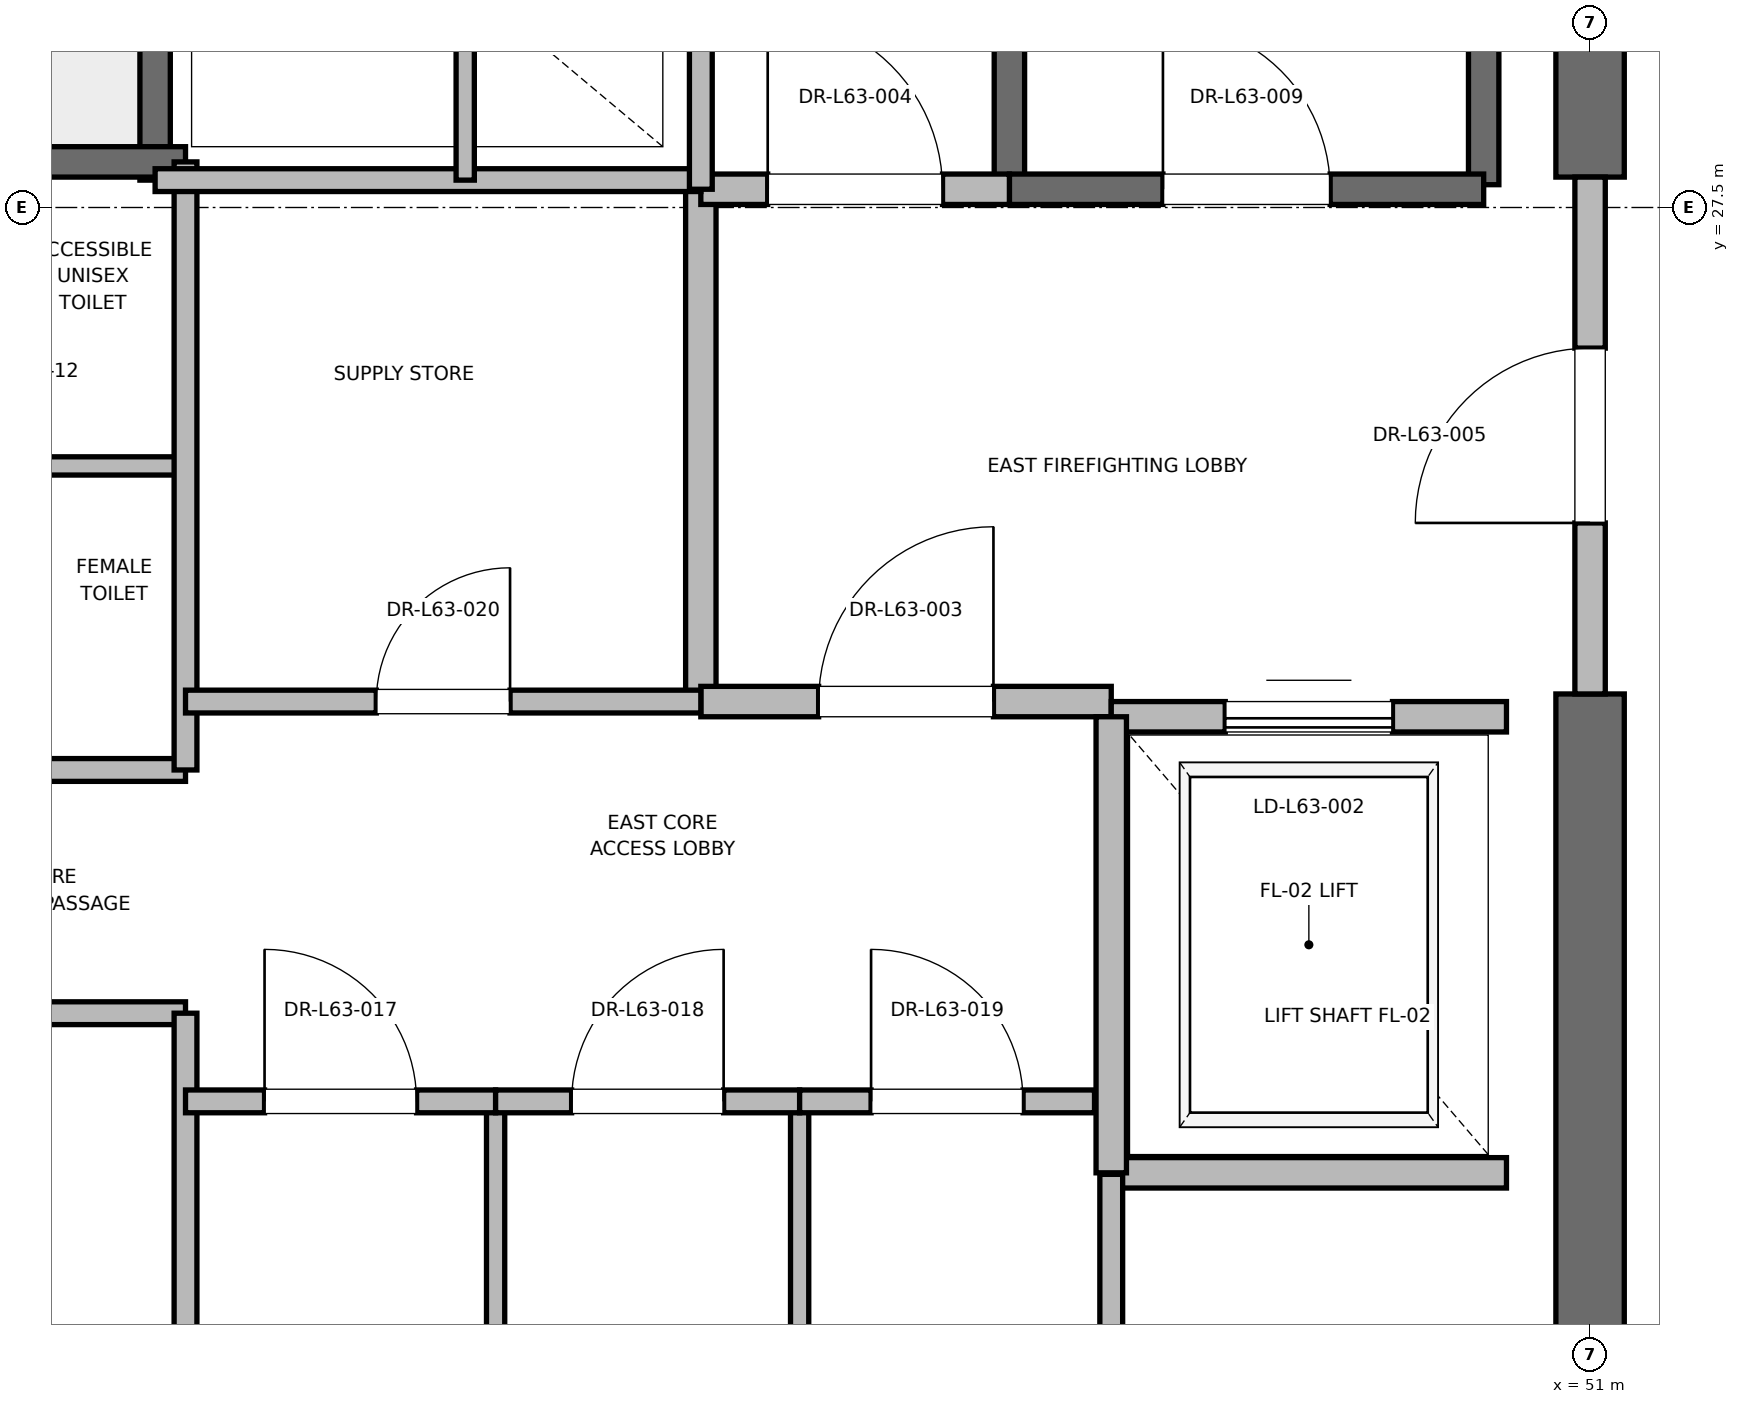
"""IFC4 building model, lengths in metres.
Left out: names, types, materials, properties, quantities, classifications, styles, units other than length and angle.
Written with IfcOpenShell. Run it as: python <this file> out.ifc"""

import sys

from ifc_helpers import new_model, si_unit, direction, frame, frame_2d, origin, place, context, subcontext, project, spatial, rectangle, extrude, element, fill, save


model = new_model("IFC4")
c1 = context("Model", 3, precision=1e-05, world=origin(), true_north=direction((0.0, 1.0)))
c2 = subcontext(c1, "Body", "Model", "MODEL_VIEW")
j1 = project(units=[si_unit("LENGTHUNIT", "METRE"), si_unit("PLANEANGLEUNIT", "RADIAN")], contexts=[c1])
p1 = place(None, origin())
s1 = spatial("IfcSite", under=j1, at=p1, CompositionType="ELEMENT")
p2 = place(p1, origin())
s2 = spatial("IfcBuilding", under=s1, at=p2, CompositionType="ELEMENT")
p3 = place(p2, frame((0.0, 0.0, 271.2)))
s3 = spatial("IfcBuildingStorey", under=s2, at=p3, CompositionType="ELEMENT", Elevation=271.2)
p4 = place(p3, frame((51.0, 18.5, 0.0), z_axis=(0.0, 0.0, 1.0), x_axis=(0.0, 1.0, 0.0)))
e1 = element("IfcWall", 1, at=p4, inside=s3, PredefinedType="SHEAR", context=c2, shape_type="SweptSolid", body=[
    extrude(rectangle(XDim=5.8, YDim=0.45, at=frame_2d((2.9, 0.0))), origin(), (0.0, 0.0, 1.0), 3.785),
])
p5 = place(p3, frame((51.0, 27.7, 0.0), z_axis=(0.0, 0.0, 1.0), x_axis=(0.0, 1.0, 0.0)))
e2 = element("IfcWall", 2, at=p5, inside=s3, PredefinedType="SHEAR", context=c2, shape_type="SweptSolid", body=[
    extrude(rectangle(XDim=8.8, YDim=0.45, at=frame_2d((4.4, 0.0))), origin(), (0.0, 0.0, 1.0), 3.785),
])
p6 = place(p3, frame((50.3, 27.65, 0.0), z_axis=(0.0, 0.0, 1.0), x_axis=(0.0, 1.0, 0.0)))
e3 = element("IfcWall", 3, at=p6, inside=s3, PredefinedType="SOLIDWALL", context=c2, shape_type="SweptSolid", body=[
    extrude(rectangle(XDim=8.15, YDim=0.2, at=frame_2d((4.075, 0.0))), origin(), (0.0, 0.0, 1.0), 3.785),
])
p7 = place(p3, frame((47.18, 27.62, 0.0), z_axis=(0.0, 0.0, 1.0), x_axis=(0.0, 1.0, 0.0)))
e4 = element("IfcWall", 4, at=p7, inside=s3, PredefinedType="SOLIDWALL", context=c2, shape_type="SweptSolid", body=[
    extrude(rectangle(XDim=8.18, YDim=0.2, at=frame_2d((4.09, 0.0))), origin(), (0.0, 0.0, 1.0), 3.785),
])
p8 = place(p3, frame((47.18, 27.62, 0.0), z_axis=(0.0, 0.0, 1.0), x_axis=(1.0, 0.0, 0.0)))
e5 = element("IfcWall", 5, at=p8, inside=s3, PredefinedType="SOLIDWALL", context=c2, shape_type="SweptSolid", body=[
    extrude(rectangle(XDim=3.12, YDim=0.2, at=frame_2d((1.56, 0.0))), origin(), (0.0, 0.0, 1.0), 3.785),
])
p9 = place(p8, frame((1.01, 0.0, 0.0)))
e6 = element("IfcOpeningElement", 6, at=p9, cuts=e5, PredefinedType="OPENING", context=c2, shape_type="SweptSolid", body=[
    extrude(rectangle(XDim=1.1, YDim=2.15, at=frame_2d((0.55, 1.075))), frame((0.0, 0.1, 0.0), z_axis=(0.0, -1.0, 0.0), x_axis=(1.0, 0.0, 0.0)), (0.0, 0.0, 1.0), 0.2),
])
p10 = place(p3, frame((41.56, 27.68, 0.0), z_axis=(0.0, 0.0, 1.0), x_axis=(0.0, 1.0, 0.0)))
e7 = element("IfcWall", 7, at=p10, inside=s3, PredefinedType="SOLIDWALL", context=c2, shape_type="SweptSolid", body=[
    extrude(rectangle(XDim=8.57, YDim=0.2, at=frame_2d((4.285, 0.0))), origin(), (0.0, 0.0, 1.0), 3.785),
])
p11 = place(p3, frame((38.44, 27.8, 0.0), z_axis=(0.0, 0.0, 1.0), x_axis=(1.0, 0.0, 0.0)))
e8 = element("IfcWall", 8, at=p11, inside=s3, PredefinedType="SOLIDWALL", context=c2, shape_type="SweptSolid", body=[
    extrude(rectangle(XDim=3.32, YDim=0.2, at=frame_2d((1.66, 0.0))), origin(), (0.0, 0.0, 1.0), 3.785),
])
p12 = place(p3, frame((45.15, 24.25, 0.0), z_axis=(0.0, 0.0, 1.0), x_axis=(0.0, 1.0, 0.0)))
e9 = element("IfcWall", 9, at=p12, inside=s3, PredefinedType="PARTITIONING", context=c2, shape_type="SweptSolid", body=[
    extrude(rectangle(XDim=3.37, YDim=0.2, at=frame_2d((1.685, 0.0))), origin(), (0.0, 0.0, 1.0), 3.785),
])
p13 = place(p3, frame((45.15, 24.25, 0.0), z_axis=(0.0, 0.0, 1.0), x_axis=(1.0, 0.0, 0.0)))
e10 = element("IfcWall", 10, at=p13, inside=s3, PredefinedType="PARTITIONING", context=c2, shape_type="SweptSolid", body=[
    extrude(rectangle(XDim=2.7, YDim=0.2, at=frame_2d((1.35, 0.0))), origin(), (0.0, 0.0, 1.0), 3.785),
])
p14 = place(p13, frame((0.775, 0.0, 0.0)))
e11 = element("IfcOpeningElement", 11, at=p14, cuts=e10, PredefinedType="OPENING", context=c2, shape_type="SweptSolid", body=[
    extrude(rectangle(XDim=1.15, YDim=2.2, at=frame_2d((0.575, 1.1))), frame((0.0, 0.1, 0.0), z_axis=(0.0, -1.0, 0.0), x_axis=(1.0, 0.0, 0.0)), (0.0, 0.0, 1.0), 0.2),
])
p15 = place(p3, frame((45.15, 27.62, 0.0), z_axis=(0.0, 0.0, 1.0), x_axis=(1.0, 0.0, 0.0)))
e12 = element("IfcWall", 12, at=p15, inside=s3, PredefinedType="PARTITIONING", context=c2, shape_type="SweptSolid", body=[
    extrude(rectangle(XDim=2.03, YDim=0.2, at=frame_2d((1.015, 0.0))), origin(), (0.0, 0.0, 1.0), 3.785),
])
p16 = place(p15, frame((0.44, 0.0, 0.0)))
e13 = element("IfcOpeningElement", 13, at=p16, cuts=e12, PredefinedType="OPENING", context=c2, shape_type="SweptSolid", body=[
    extrude(rectangle(XDim=1.15, YDim=2.2, at=frame_2d((0.575, 1.1))), frame((0.0, 0.1, 0.0), z_axis=(0.0, -1.0, 0.0), x_axis=(1.0, 0.0, 0.0)), (0.0, 0.0, 1.0), 0.2),
])
p17 = place(p3, frame((51.0, 24.3, 0.0), z_axis=(0.0, 0.0, 1.0), x_axis=(0.0, 1.0, 0.0)))
e14 = element("IfcWall", 14, at=p17, inside=s3, PredefinedType="PARTITIONING", context=c2, shape_type="SweptSolid", body=[
    extrude(rectangle(XDim=3.4, YDim=0.2, at=frame_2d((1.7, 0.0))), origin(), (0.0, 0.0, 1.0), 2.865),
])
p18 = place(p17, frame((1.125, 0.0, 0.0)))
e15 = element("IfcOpeningElement", 15, at=p18, cuts=e14, PredefinedType="OPENING", context=c2, shape_type="SweptSolid", body=[
    extrude(rectangle(XDim=1.15, YDim=2.2, at=frame_2d((0.575, 1.1))), frame((0.0, 0.1, 0.0), z_axis=(0.0, -1.0, 0.0), x_axis=(1.0, 0.0, 0.0)), (0.0, 0.0, 1.0), 0.2),
])
p19 = place(p3, frame((47.85, 21.15, 0.0), z_axis=(0.0, 0.0, 1.0), x_axis=(1.0, 0.0, 0.0)))
e16 = element("IfcWall", 16, at=p19, inside=s3, PredefinedType="SOLIDWALL", context=c2, shape_type="SweptSolid", body=[
    extrude(rectangle(XDim=2.6, YDim=0.2, at=frame_2d((1.3, 0.0))), origin(), (0.0, 0.0, 1.0), 3.785),
])
p20 = place(p3, frame((50.45, 24.15, 0.0), z_axis=(0.0, 0.0, 1.0), x_axis=(-1.0, 0.0, 0.0)))
e17 = element("IfcWall", 17, at=p20, inside=s3, PredefinedType="SOLIDWALL", context=c2, shape_type="SweptSolid", body=[
    extrude(rectangle(XDim=2.6, YDim=0.2, at=frame_2d((1.3, 0.0))), origin(), (0.0, 0.0, 1.0), 2.865),
])
p21 = place(p20, frame((0.75, 0.0, 0.0)))
e18 = element("IfcOpeningElement", 18, at=p21, cuts=e17, PredefinedType="OPENING", context=c2, shape_type="SweptSolid", body=[
    extrude(rectangle(XDim=1.1, YDim=2.2, at=frame_2d((0.55, 1.1))), frame((0.0, 0.1, 0.0), z_axis=(0.0, -1.0, 0.0), x_axis=(1.0, 0.0, 0.0)), (0.0, 0.0, 1.0), 0.2),
])
p22 = place(p3, frame((47.85, 24.15, 0.0), z_axis=(0.0, 0.0, 1.0), x_axis=(0.0, -1.0, 0.0)))
e19 = element("IfcWall", 19, at=p22, inside=s3, PredefinedType="SOLIDWALL", context=c2, shape_type="SweptSolid", body=[
    extrude(rectangle(XDim=3.0, YDim=0.2, at=frame_2d((1.5, 0.0))), origin(), (0.0, 0.0, 1.0), 3.785),
])
for number, where, z_axis, x_axis in (
    (20, (39.95, 22.2, 0.0), (0.0, 0.0, 1.0), (1.0, 0.0, 0.0)),
    (21, (39.95, 23.8, 0.0), (0.0, 0.0, 1.0), (1.0, 0.0, 0.0)),
):
    element("IfcWall", number, at=place(p3, frame(where, z_axis=z_axis, x_axis=x_axis)), inside=s3, PredefinedType="PARTITIONING", context=c2, shape_type="SweptSolid", body=[
        extrude(rectangle(XDim=1.81, YDim=0.15, at=frame_2d((0.905, 0.0))), origin(), (0.0, 0.0, 1.0), 2.85),
    ])
p23 = place(p3, frame((39.95, 25.8, 0.0), z_axis=(0.0, 0.0, 1.0), x_axis=(1.0, 0.0, 0.0)))
e22 = element("IfcWall", 22, at=p23, inside=s3, PredefinedType="PARTITIONING", context=c2, shape_type="SweptSolid", body=[
    extrude(rectangle(XDim=1.81, YDim=0.12, at=frame_2d((0.905, 0.0))), origin(), (0.0, 0.0, 1.0), 2.85),
])
p24 = place(p3, frame((41.76, 18.6, 0.0), z_axis=(0.0, 0.0, 1.0), x_axis=(0.0, 1.0, 0.0)))
e23 = element("IfcWall", 23, at=p24, inside=s3, PredefinedType="PARTITIONING", context=c2, shape_type="SweptSolid", body=[
    extrude(rectangle(XDim=3.6, YDim=0.15, at=frame_2d((1.8, 0.0))), origin(), (0.0, 0.0, 1.0), 2.85),
])
p25 = place(p3, frame((41.76, 23.8, 0.0), z_axis=(0.0, 0.0, 1.0), x_axis=(0.0, 1.0, 0.0)))
e24 = element("IfcWall", 24, at=p25, inside=s3, PredefinedType="PARTITIONING", context=c2, shape_type="SweptSolid", body=[
    extrude(rectangle(XDim=4.0, YDim=0.15, at=frame_2d((2.0, 0.0))), origin(), (0.0, 0.0, 1.0), 2.85),
])
p26 = place(p3, frame((41.56, 27.68, 0.0), z_axis=(0.0, 0.0, 1.0), x_axis=(1.0, 0.0, 0.0)))
e25 = element("IfcWall", 25, at=p26, inside=s3, PredefinedType="PARTITIONING", context=c2, shape_type="SweptSolid", body=[
    extrude(rectangle(XDim=3.59, YDim=0.15, at=frame_2d((1.795, 0.0))), origin(), (0.0, 0.0, 1.0), 2.85),
])
p27 = place(p3, frame((47.85, 18.6, 0.0), z_axis=(0.0, 0.0, 1.0), x_axis=(0.0, 1.0, 0.0)))
e26 = element("IfcWall", 26, at=p27, inside=s3, PredefinedType="PARTITIONING", context=c2, shape_type="SweptSolid", body=[
    extrude(rectangle(XDim=2.54, YDim=0.15, at=frame_2d((1.27, 0.0))), origin(), (0.0, 0.0, 1.0), 2.85),
])
for number, where, z_axis, x_axis in (
    (27, (43.8, 18.6, 0.0), (0.0, 0.0, 1.0), (0.0, 1.0, 0.0)),
    (28, (45.8, 18.6, 0.0), (0.0, 0.0, 1.0), (0.0, 1.0, 0.0)),
):
    element("IfcWall", number, at=place(p3, frame(where, z_axis=z_axis, x_axis=x_axis)), inside=s3, PredefinedType="PARTITIONING", context=c2, shape_type="SweptSolid", body=[
        extrude(rectangle(XDim=3.02, YDim=0.12, at=frame_2d((1.51, 0.0))), origin(), (0.0, 0.0, 1.0), 2.85),
    ])
p28 = place(p3, frame((41.76, 21.62, 0.0), z_axis=(0.0, 0.0, 1.0), x_axis=(1.0, 0.0, 0.0)))
e29 = element("IfcWall", 29, at=p28, inside=s3, PredefinedType="PARTITIONING", context=c2, shape_type="SweptSolid", body=[
    extrude(rectangle(XDim=2.04, YDim=0.15, at=frame_2d((1.02, 0.0))), origin(), (0.0, 0.0, 1.0), 2.85),
])
p29 = place(p28, frame((0.52, 0.0, 0.0)))
e30 = element("IfcOpeningElement", 30, at=p29, cuts=e29, PredefinedType="OPENING", context=c2, shape_type="SweptSolid", body=[
    extrude(rectangle(XDim=1.0, YDim=2.15, at=frame_2d((0.5, 1.075))), frame((0.0, 0.075, 0.0), z_axis=(0.0, -1.0, 0.0), x_axis=(1.0, 0.0, 0.0)), (0.0, 0.0, 1.0), 0.15),
])
p30 = place(p3, frame((43.8, 21.62, 0.0), z_axis=(0.0, 0.0, 1.0), x_axis=(1.0, 0.0, 0.0)))
e31 = element("IfcWall", 31, at=p30, inside=s3, PredefinedType="PARTITIONING", context=c2, shape_type="SweptSolid", body=[
    extrude(rectangle(XDim=2.0, YDim=0.15, at=frame_2d((1.0, 0.0))), origin(), (0.0, 0.0, 1.0), 2.85),
])
p31 = place(p30, frame((0.5, 0.0, 0.0)))
e32 = element("IfcOpeningElement", 32, at=p31, cuts=e31, PredefinedType="OPENING", context=c2, shape_type="SweptSolid", body=[
    extrude(rectangle(XDim=1.0, YDim=2.15, at=frame_2d((0.5, 1.075))), frame((0.0, 0.075, 0.0), z_axis=(0.0, -1.0, 0.0), x_axis=(1.0, 0.0, 0.0)), (0.0, 0.0, 1.0), 0.15),
])
p32 = place(p3, frame((45.8, 21.62, 0.0), z_axis=(0.0, 0.0, 1.0), x_axis=(1.0, 0.0, 0.0)))
e33 = element("IfcWall", 33, at=p32, inside=s3, PredefinedType="PARTITIONING", context=c2, shape_type="SweptSolid", body=[
    extrude(rectangle(XDim=1.94, YDim=0.15, at=frame_2d((0.97, 0.0))), origin(), (0.0, 0.0, 1.0), 2.85),
])
p33 = place(p32, frame((0.47, 0.0, 0.0)))
e34 = element("IfcOpeningElement", 34, at=p33, cuts=e33, PredefinedType="OPENING", context=c2, shape_type="SweptSolid", body=[
    extrude(rectangle(XDim=1.0, YDim=2.15, at=frame_2d((0.5, 1.075))), frame((0.0, 0.075, 0.0), z_axis=(0.0, -1.0, 0.0), x_axis=(1.0, 0.0, 0.0)), (0.0, 0.0, 1.0), 0.15),
])
p34 = place(p3, frame((41.76, 24.25, 0.0), z_axis=(0.0, 0.0, 1.0), x_axis=(1.0, 0.0, 0.0)))
e35 = element("IfcWall", 35, at=p34, inside=s3, PredefinedType="PARTITIONING", context=c2, shape_type="SweptSolid", body=[
    extrude(rectangle(XDim=3.39, YDim=0.15, at=frame_2d((1.695, 0.0))), origin(), (0.0, 0.0, 1.0), 2.85),
])
p35 = place(p34, frame((1.255, 0.0, 0.0)))
e36 = element("IfcOpeningElement", 36, at=p35, cuts=e35, PredefinedType="OPENING", context=c2, shape_type="SweptSolid", body=[
    extrude(rectangle(XDim=0.88, YDim=2.1, at=frame_2d((0.44, 1.05))), frame((0.0, 0.075, 0.0), z_axis=(0.0, -1.0, 0.0), x_axis=(1.0, 0.0, 0.0)), (0.0, 0.0, 1.0), 0.15),
])
p36 = place(p3, frame((45.15, 27.62, 0.0), z_axis=(0.0, 0.0, 1.0), x_axis=(0.0, 1.0, 0.0)))
e37 = element("IfcWall", 37, at=p36, inside=s3, PredefinedType="PARTITIONING", context=c2, shape_type="SweptSolid", body=[
    extrude(rectangle(XDim=3.1, YDim=0.15, at=frame_2d((1.55, 0.0))), origin(), (0.0, 0.0, 1.0), 2.85),
])
p37 = place(p3, frame((43.6, 27.68, 0.0), z_axis=(0.0, 0.0, 1.0), x_axis=(0.0, 1.0, 0.0)))
e38 = element("IfcWall", 38, at=p37, inside=s3, PredefinedType="PARTITIONING", context=c2, shape_type="SweptSolid", body=[
    extrude(rectangle(XDim=3.04, YDim=0.12, at=frame_2d((1.52, 0.0))), origin(), (0.0, 0.0, 1.0), 2.85),
])
p38 = place(p9, origin())
e39 = element("IfcDoor", 39, at=p38, inside=s3, OperationType="SINGLE_SWING_LEFT", PredefinedType="DOOR", context=c2, shape_type="SweptSolid", body=[
    extrude(rectangle(XDim=1.1, YDim=2.15, at=frame_2d((0.55, 1.075))), frame((0.0, 0.025, 0.0), z_axis=(0.0, -1.0, 0.0), x_axis=(1.0, 0.0, 0.0)), (0.0, 0.0, 1.0), 0.05),
])
fill(e6, e39)
p39 = place(p14, origin())
e40 = element("IfcDoor", 40, at=p39, inside=s3, OperationType="SINGLE_SWING_RIGHT", PredefinedType="DOOR", context=c2, shape_type="SweptSolid", body=[
    extrude(rectangle(XDim=1.15, YDim=2.2, at=frame_2d((0.575, 1.1))), frame((0.0, 0.025, 0.0), z_axis=(0.0, -1.0, 0.0), x_axis=(1.0, 0.0, 0.0)), (0.0, 0.0, 1.0), 0.05),
])
fill(e11, e40)
p40 = place(p16, origin())
e41 = element("IfcDoor", 41, at=p40, inside=s3, OperationType="SINGLE_SWING_LEFT", PredefinedType="DOOR", context=c2, shape_type="SweptSolid", body=[
    extrude(rectangle(XDim=1.15, YDim=2.2, at=frame_2d((0.575, 1.1))), frame((0.0, 0.025, 0.0), z_axis=(0.0, -1.0, 0.0), x_axis=(1.0, 0.0, 0.0)), (0.0, 0.0, 1.0), 0.05),
])
fill(e13, e41)
p41 = place(p18, origin())
e42 = element("IfcDoor", 42, at=p41, inside=s3, OperationType="SINGLE_SWING_LEFT", PredefinedType="DOOR", context=c2, shape_type="SweptSolid", body=[
    extrude(rectangle(XDim=1.15, YDim=2.2, at=frame_2d((0.575, 1.1))), frame((0.0, 0.025, 0.0), z_axis=(0.0, -1.0, 0.0), x_axis=(1.0, 0.0, 0.0)), (0.0, 0.0, 1.0), 0.05),
])
fill(e15, e42)
p42 = place(p21, origin())
e43 = element("IfcDoor", 43, at=p42, inside=s3, OperationType="SLIDING_TO_RIGHT", PredefinedType="DOOR", context=c2, shape_type="SweptSolid", body=[
    extrude(rectangle(XDim=1.1, YDim=2.2, at=frame_2d((0.55, 1.1))), frame((0.0, 0.025, 0.0), z_axis=(0.0, -1.0, 0.0), x_axis=(1.0, 0.0, 0.0)), (0.0, 0.0, 1.0), 0.05),
])
fill(e18, e43)
p43 = place(p29, origin())
e44 = element("IfcDoor", 44, at=p43, inside=s3, OperationType="SINGLE_SWING_LEFT", PredefinedType="DOOR", context=c2, shape_type="SweptSolid", body=[
    extrude(rectangle(XDim=1.0, YDim=2.15, at=frame_2d((0.5, 1.075))), frame((0.0, 0.025, 0.0), z_axis=(0.0, -1.0, 0.0), x_axis=(1.0, 0.0, 0.0)), (0.0, 0.0, 1.0), 0.05),
])
fill(e30, e44)
p44 = place(p31, origin())
e45 = element("IfcDoor", 45, at=p44, inside=s3, OperationType="SINGLE_SWING_RIGHT", PredefinedType="DOOR", context=c2, shape_type="SweptSolid", body=[
    extrude(rectangle(XDim=1.0, YDim=2.15, at=frame_2d((0.5, 1.075))), frame((0.0, 0.025, 0.0), z_axis=(0.0, -1.0, 0.0), x_axis=(1.0, 0.0, 0.0)), (0.0, 0.0, 1.0), 0.05),
])
fill(e32, e45)
p45 = place(p33, origin())
e46 = element("IfcDoor", 46, at=p45, inside=s3, OperationType="SINGLE_SWING_LEFT", PredefinedType="DOOR", context=c2, shape_type="SweptSolid", body=[
    extrude(rectangle(XDim=1.0, YDim=2.15, at=frame_2d((0.5, 1.075))), frame((0.0, 0.025, 0.0), z_axis=(0.0, -1.0, 0.0), x_axis=(1.0, 0.0, 0.0)), (0.0, 0.0, 1.0), 0.05),
])
fill(e34, e46)
p46 = place(p35, origin())
e47 = element("IfcDoor", 47, at=p46, inside=s3, OperationType="SINGLE_SWING_RIGHT", PredefinedType="DOOR", context=c2, shape_type="SweptSolid", body=[
    extrude(rectangle(XDim=0.88, YDim=2.1, at=frame_2d((0.44, 1.05))), frame((0.0, 0.025, 0.0), z_axis=(0.0, -1.0, 0.0), x_axis=(1.0, 0.0, 0.0)), (0.0, 0.0, 1.0), 0.05),
])
fill(e36, e47)
save(model, sys.argv[1])
